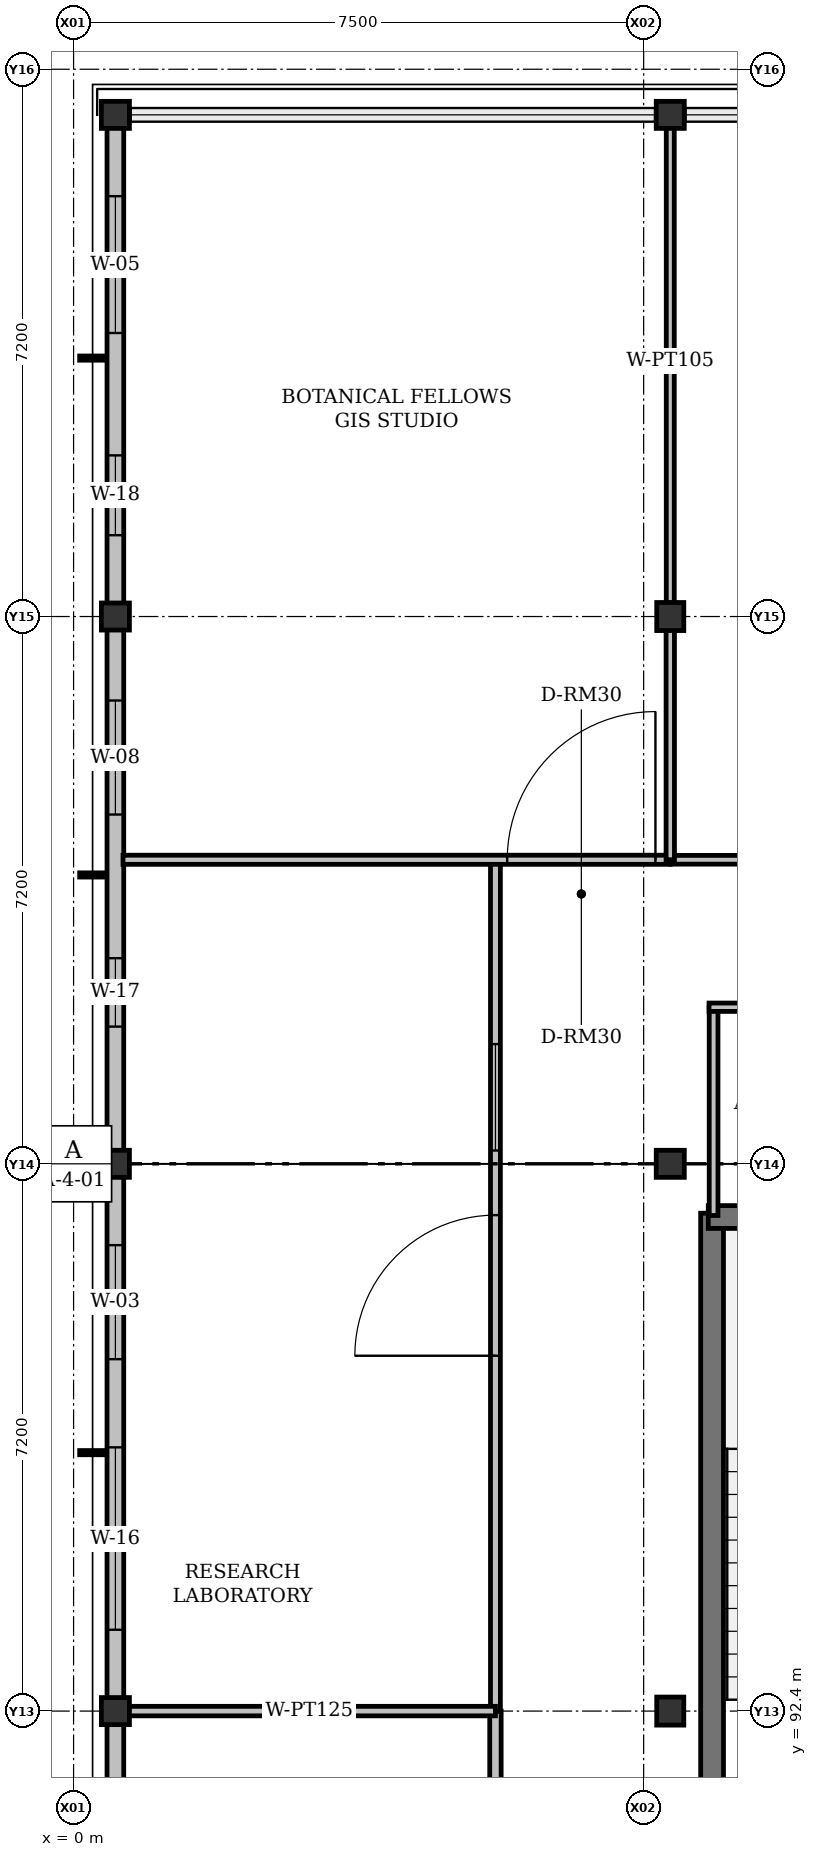
"""IFC4 building model, lengths in metres.
Left out: names, types, materials, properties, quantities, classifications, styles, units other than length and angle.
Written with IfcOpenShell. Run it as: python <this file> out.ifc"""

import sys

from ifc_helpers import new_model, si_unit, direction, frame, frame_2d, origin, origin_2d, place, context, subcontext, project, spatial, rectangle, i_section, extrude, element, fill, save


model = new_model("IFC4")
c1 = context("Model", 3, precision=1e-05, world=origin(), true_north=direction((0.0, 1.0)))
c2 = subcontext(c1, "Body", "Model", "MODEL_VIEW")
j1 = project(units=[si_unit("LENGTHUNIT", "METRE"), si_unit("PLANEANGLEUNIT", "RADIAN")], contexts=[c1])
p1 = place(None, origin())
s1 = spatial("IfcSite", under=j1, at=p1, CompositionType="ELEMENT")
p2 = place(p1, origin())
s2 = spatial("IfcBuilding", under=s1, at=p2, CompositionType="ELEMENT")
p3 = place(p2, frame((0.0, 0.0, 51.9)))
s3 = spatial("IfcBuildingStorey", under=s2, at=p3, CompositionType="ELEMENT", Elevation=51.9)
for number, where, z_axis, x_axis in (
    (1, (0.55, 92.4, 0.0), (0.0, 0.0, 1.0), (1.0, 0.0, 0.0)),
    (2, (7.85, 92.4, 0.0), (0.0, 0.0, 1.0), (0.0, 1.0, 0.0)),
    (3, (0.55, 99.6, 0.0), (0.0, 0.0, 1.0), (1.0, 0.0, 0.0)),
    (4, (7.85, 99.6, 0.0), (0.0, 0.0, 1.0), (1.0, 0.0, 0.0)),
    (5, (0.55, 106.8, 0.0), (0.0, 0.0, 1.0), (1.0, 0.0, 0.0)),
    (6, (7.85, 106.8, 0.0), (0.0, 0.0, 1.0), (0.0, 1.0, 0.0)),
    (7, (0.55, 113.4, 0.0), (0.0, 0.0, 1.0), (1.0, 0.0, 0.0)),
    (8, (7.85, 113.4, 0.0), (0.0, 0.0, 1.0), (1.0, 0.0, 0.0)),
):
    element("IfcColumn", number, at=place(p3, frame(where, z_axis=z_axis, x_axis=x_axis)), inside=s3, PredefinedType="COLUMN", context=c2, shape_type="SweptSolid", body=[
        extrude(i_section(OverallWidth=0.369, OverallDepth=0.356, WebThickness=0.011, FlangeThickness=0.018, FilletRadius=0.015, at=origin_2d()), origin(), (0.0, 0.0, 1.0), 4.2),
    ])
p4 = place(p3, frame((0.55, 85.2, 0.0), z_axis=(0.0, 0.0, 1.0), x_axis=(0.0, 1.0, 0.0)))
e9 = element("IfcWall", 9, at=p4, inside=s3, PredefinedType="SOLIDWALL", context=c2, shape_type="SweptSolid", body=[
    extrude(rectangle(XDim=7.2, YDim=0.22, at=frame_2d((3.6, 0.0))), origin(), (0.0, 0.0, 1.0), 3.577),
])
p5 = place(p4, frame((1.07, 0.0, 0.92)))
e10 = element("IfcOpeningElement", 10, at=p5, cuts=e9, PredefinedType="OPENING", context=c2, shape_type="SweptSolid", body=[
    extrude(rectangle(XDim=2.1, YDim=1.7, at=frame_2d((1.05, 0.85))), frame((0.0, 0.11, 0.0), z_axis=(0.0, -1.0, 0.0), x_axis=(1.0, 0.0, 0.0)), (0.0, 0.0, 1.0), 0.22),
])
p6 = place(p4, frame((4.78, 0.0, 0.92)))
e11 = element("IfcOpeningElement", 11, at=p6, cuts=e9, PredefinedType="OPENING", context=c2, shape_type="SweptSolid", body=[
    extrude(rectangle(XDim=1.35, YDim=1.4, at=frame_2d((0.675, 0.7))), frame((0.0, 0.11, 0.0), z_axis=(0.0, -1.0, 0.0), x_axis=(1.0, 0.0, 0.0)), (0.0, 0.0, 1.0), 0.22),
])
p7 = place(p3, frame((0.55, 92.4, 0.0), z_axis=(0.0, 0.0, 1.0), x_axis=(0.0, 1.0, 0.0)))
e12 = element("IfcWall", 12, at=p7, inside=s3, PredefinedType="SOLIDWALL", context=c2, shape_type="SweptSolid", body=[
    extrude(rectangle(XDim=7.2, YDim=0.22, at=frame_2d((3.6, 0.0))), origin(), (0.0, 0.0, 1.0), 3.577),
])
p8 = place(p7, frame((1.07, 0.0, 0.92)))
e13 = element("IfcOpeningElement", 13, at=p8, cuts=e12, PredefinedType="OPENING", context=c2, shape_type="SweptSolid", body=[
    extrude(rectangle(XDim=2.4, YDim=1.7, at=frame_2d((1.2, 0.85))), frame((0.0, 0.11, 0.0), z_axis=(0.0, -1.0, 0.0), x_axis=(1.0, 0.0, 0.0)), (0.0, 0.0, 1.0), 0.22),
])
p9 = place(p7, frame((4.63, 0.0, 0.92)))
e14 = element("IfcOpeningElement", 14, at=p9, cuts=e12, PredefinedType="OPENING", context=c2, shape_type="SweptSolid", body=[
    extrude(rectangle(XDim=1.5, YDim=1.4, at=frame_2d((0.75, 0.7))), frame((0.0, 0.11, 0.0), z_axis=(0.0, -1.0, 0.0), x_axis=(1.0, 0.0, 0.0)), (0.0, 0.0, 1.0), 0.22),
])
p10 = place(p3, frame((0.55, 99.6, 0.0), z_axis=(0.0, 0.0, 1.0), x_axis=(0.0, 1.0, 0.0)))
e15 = element("IfcWall", 15, at=p10, inside=s3, PredefinedType="SOLIDWALL", context=c2, shape_type="SweptSolid", body=[
    extrude(rectangle(XDim=7.2, YDim=0.22, at=frame_2d((3.6, 0.0))), origin(), (0.0, 0.0, 1.0), 3.577),
])
p11 = place(p10, frame((1.805, 0.0, 0.92)))
e16 = element("IfcOpeningElement", 16, at=p11, cuts=e15, PredefinedType="OPENING", context=c2, shape_type="SweptSolid", body=[
    extrude(rectangle(XDim=0.9, YDim=1.3, at=frame_2d((0.45, 0.65))), frame((0.0, 0.11, 0.0), z_axis=(0.0, -1.0, 0.0), x_axis=(1.0, 0.0, 0.0)), (0.0, 0.0, 1.0), 0.22),
])
p12 = place(p10, frame((4.595, 0.0, 0.92)))
e17 = element("IfcOpeningElement", 17, at=p12, cuts=e15, PredefinedType="OPENING", context=c2, shape_type="SweptSolid", body=[
    extrude(rectangle(XDim=1.5, YDim=1.55, at=frame_2d((0.75, 0.775))), frame((0.0, 0.11, 0.0), z_axis=(0.0, -1.0, 0.0), x_axis=(1.0, 0.0, 0.0)), (0.0, 0.0, 1.0), 0.22),
])
p13 = place(p3, frame((0.55, 106.8, 0.0), z_axis=(0.0, 0.0, 1.0), x_axis=(0.0, 1.0, 0.0)))
e18 = element("IfcWall", 18, at=p13, inside=s3, PredefinedType="SOLIDWALL", context=c2, shape_type="SweptSolid", body=[
    extrude(rectangle(XDim=6.6, YDim=0.22, at=frame_2d((3.3, 0.0))), origin(), (0.0, 0.0, 1.0), 3.577),
])
p14 = place(p13, frame((1.07, 0.0, 0.92)))
e19 = element("IfcOpeningElement", 19, at=p14, cuts=e18, PredefinedType="OPENING", context=c2, shape_type="SweptSolid", body=[
    extrude(rectangle(XDim=1.05, YDim=1.3, at=frame_2d((0.525, 0.65))), frame((0.0, 0.11, 0.0), z_axis=(0.0, -1.0, 0.0), x_axis=(1.0, 0.0, 0.0)), (0.0, 0.0, 1.0), 0.22),
])
p15 = place(p13, frame((3.73, 0.0, 0.92)))
e20 = element("IfcOpeningElement", 20, at=p15, cuts=e18, PredefinedType="OPENING", context=c2, shape_type="SweptSolid", body=[
    extrude(rectangle(XDim=1.8, YDim=1.4, at=frame_2d((0.9, 0.7))), frame((0.0, 0.11, 0.0), z_axis=(0.0, -1.0, 0.0), x_axis=(1.0, 0.0, 0.0)), (0.0, 0.0, 1.0), 0.22),
])
p16 = place(p3, frame((8.4, 90.775, 0.0), z_axis=(0.0, 0.0, 1.0), x_axis=(0.0, 1.0, 0.0)))
e21 = element("IfcWall", 21, at=p16, inside=s3, PredefinedType="SHEAR", context=c2, shape_type="SweptSolid", body=[
    extrude(rectangle(XDim=8.175, YDim=0.3, at=frame_2d((4.087, 0.0))), origin(), (0.0, 0.0, 1.0), 4.2),
])
p17 = place(p3, frame((8.35, 98.9, 0.0), z_axis=(0.0, 0.0, 1.0), x_axis=(1.0, 0.0, 0.0)))
e22 = element("IfcWall", 22, at=p17, inside=s3, PredefinedType="SHEAR", context=c2, shape_type="SweptSolid", body=[
    extrude(rectangle(XDim=3.77, YDim=0.3, at=frame_2d((1.885, 0.0))), origin(), (0.0, 0.0, 1.0), 4.2),
])
p18 = place(p3, frame((8.42, 98.92, 0.0), z_axis=(0.0, 0.0, 1.0), x_axis=(0.0, 1.0, 0.0)))
e23 = element("IfcWall", 23, at=p18, inside=s3, PredefinedType="PARTITIONING", context=c2, shape_type="SweptSolid", body=[
    extrude(rectangle(XDim=2.74, YDim=0.115, at=frame_2d((1.37, 0.0))), origin(), (0.0, 0.0, 1.0), 3.451),
])
p19 = place(p3, frame((8.36, 101.66, 0.0), z_axis=(0.0, 0.0, 1.0), x_axis=(1.0, 0.0, 0.0)))
e24 = element("IfcWall", 24, at=p19, inside=s3, PredefinedType="PARTITIONING", context=c2, shape_type="SweptSolid", body=[
    extrude(rectangle(XDim=3.7, YDim=0.11, at=frame_2d((1.85, 0.0))), origin(), (0.0, 0.0, 1.0), 3.95),
])
p20 = place(p3, frame((5.55, 78.0, 0.0), z_axis=(0.0, 0.0, 1.0), x_axis=(0.0, 1.0, 0.0)))
e25 = element("IfcWall", 25, at=p20, inside=s3, PredefinedType="PARTITIONING", context=c2, shape_type="SweptSolid", body=[
    extrude(rectangle(XDim=14.4, YDim=0.15, at=frame_2d((7.2, 0.0))), origin(), (0.0, 0.0, 1.0), 3.451),
])
p21 = place(p20, frame((6.325, 0.0, 0.0)))
e26 = element("IfcOpeningElement", 26, at=p21, cuts=e25, PredefinedType="OPENING", context=c2, shape_type="SweptSolid", body=[
    extrude(rectangle(XDim=1.75, YDim=2.35, at=frame_2d((0.875, 1.175))), frame((0.0, 0.075, 0.0), z_axis=(0.0, -1.0, 0.0), x_axis=(1.0, 0.0, 0.0)), (0.0, 0.0, 1.0), 0.15),
])
p22 = place(p20, frame((8.925, 0.0, 0.92)))
e27 = element("IfcOpeningElement", 27, at=p22, cuts=e25, PredefinedType="OPENING", context=c2, shape_type="SweptSolid", body=[
    extrude(rectangle(XDim=1.2, YDim=1.2, at=frame_2d((0.6, 0.6))), frame((0.0, 0.075, 0.0), z_axis=(0.0, -1.0, 0.0), x_axis=(1.0, 0.0, 0.0)), (0.0, 0.0, 1.0), 0.15),
])
p23 = place(p3, frame((5.55, 92.4, 0.0), z_axis=(0.0, 0.0, 1.0), x_axis=(0.0, 1.0, 0.0)))
e28 = element("IfcWall", 28, at=p23, inside=s3, PredefinedType="PARTITIONING", context=c2, shape_type="SweptSolid", body=[
    extrude(rectangle(XDim=11.2, YDim=0.13, at=frame_2d((5.6, 0.0))), origin(), (0.0, 0.0, 1.0), 3.451),
])
p24 = place(p23, frame((4.675, 0.0, 0.0)))
e29 = element("IfcOpeningElement", 29, at=p24, cuts=e28, PredefinedType="OPENING", context=c2, shape_type="SweptSolid", body=[
    extrude(rectangle(XDim=1.85, YDim=2.35, at=frame_2d((0.925, 1.175))), frame((0.0, 0.065, 0.0), z_axis=(0.0, -1.0, 0.0), x_axis=(1.0, 0.0, 0.0)), (0.0, 0.0, 1.0), 0.13),
])
p25 = place(p23, frame((7.375, 0.0, 0.92)))
e30 = element("IfcOpeningElement", 30, at=p25, cuts=e28, PredefinedType="OPENING", context=c2, shape_type="SweptSolid", body=[
    extrude(rectangle(XDim=1.4, YDim=1.2, at=frame_2d((0.7, 0.6))), frame((0.0, 0.065, 0.0), z_axis=(0.0, -1.0, 0.0), x_axis=(1.0, 0.0, 0.0)), (0.0, 0.0, 1.0), 0.13),
])
p26 = place(p3, frame((0.65, 92.4, 0.0), z_axis=(0.0, 0.0, 1.0), x_axis=(1.0, 0.0, 0.0)))
e31 = element("IfcWall", 31, at=p26, inside=s3, PredefinedType="PARTITIONING", context=c2, shape_type="SweptSolid", body=[
    extrude(rectangle(XDim=4.9, YDim=0.125, at=frame_2d((2.45, 0.0))), origin(), (0.0, 0.0, 1.0), 3.451),
])
p27 = place(p3, frame((0.65, 103.6, 0.0), z_axis=(0.0, 0.0, 1.0), x_axis=(1.0, 0.0, 0.0)))
e32 = element("IfcWall", 32, at=p27, inside=s3, PredefinedType="PARTITIONING", context=c2, shape_type="SweptSolid", body=[
    extrude(rectangle(XDim=7.2, YDim=0.12, at=frame_2d((3.6, 0.0))), origin(), (0.0, 0.0, 1.0), 3.527),
])
p28 = place(p27, frame((5.055, 0.0, 0.0)))
e33 = element("IfcOpeningElement", 33, at=p28, cuts=e32, PredefinedType="OPENING", context=c2, shape_type="SweptSolid", body=[
    extrude(rectangle(XDim=1.95, YDim=2.4, at=frame_2d((0.975, 1.2))), frame((0.0, 0.06, 0.0), z_axis=(0.0, -1.0, 0.0), x_axis=(1.0, 0.0, 0.0)), (0.0, 0.0, 1.0), 0.12),
])
p29 = place(p3, frame((7.85, 103.6, 0.0), z_axis=(0.0, 0.0, 1.0), x_axis=(1.0, 0.0, 0.0)))
e34 = element("IfcWall", 34, at=p29, inside=s3, PredefinedType="PARTITIONING", context=c2, shape_type="SweptSolid", body=[
    extrude(rectangle(XDim=16.94, YDim=0.115, at=frame_2d((8.47, 0.0))), origin(), (0.0, 0.0, 1.0), 3.527),
])
p30 = place(p29, frame((2.3, 0.0, 0.0)))
e35 = element("IfcOpeningElement", 35, at=p30, cuts=e34, PredefinedType="OPENING", context=c2, shape_type="SweptSolid", body=[
    extrude(rectangle(XDim=0.9, YDim=2.08, at=frame_2d((0.45, 1.04))), frame((0.0, 0.058, 0.0), z_axis=(0.0, -1.0, 0.0), x_axis=(1.0, 0.0, 0.0)), (0.0, 0.0, 1.0), 0.115),
])
p31 = place(p29, frame((4.05, 0.0, 0.92)))
e36 = element("IfcOpeningElement", 36, at=p31, cuts=e34, PredefinedType="OPENING", context=c2, shape_type="SweptSolid", body=[
    extrude(rectangle(XDim=1.0, YDim=1.3, at=frame_2d((0.5, 0.65))), frame((0.0, 0.058, 0.0), z_axis=(0.0, -1.0, 0.0), x_axis=(1.0, 0.0, 0.0)), (0.0, 0.0, 1.0), 0.115),
])
p32 = place(p3, frame((7.85, 106.621, 0.0), z_axis=(0.0, 0.0, 1.0), x_axis=(0.0, -1.0, 0.0)))
e37 = element("IfcWall", 37, at=p32, inside=s3, PredefinedType="PARTITIONING", context=c2, shape_type="SweptSolid", body=[
    extrude(rectangle(XDim=3.021, YDim=0.11, at=frame_2d((1.51, 0.0))), origin(), (0.0, 0.0, 1.0), 3.527),
])
p33 = place(p3, frame((7.85, 113.35, 0.0), z_axis=(0.0, 0.0, 1.0), x_axis=(0.0, -1.0, 0.0)))
e38 = element("IfcWall", 38, at=p33, inside=s3, PredefinedType="PARTITIONING", context=c2, shape_type="SweptSolid", body=[
    extrude(rectangle(XDim=6.371, YDim=0.105, at=frame_2d((3.185, 0.0))), origin(), (0.0, 0.0, 1.0), 3.527),
])
p34 = place(p8, origin())
e39 = element("IfcWindow", 39, at=p34, inside=s3, PartitioningType="DOUBLE_PANEL_VERTICAL", PredefinedType="WINDOW", context=c2, shape_type="SweptSolid", body=[
    extrude(rectangle(XDim=2.4, YDim=1.7, at=frame_2d((1.2, 0.85))), frame((0.0, 0.03, 0.0), z_axis=(0.0, -1.0, 0.0), x_axis=(1.0, 0.0, 0.0)), (0.0, 0.0, 1.0), 0.06),
])
fill(e13, e39)
p35 = place(p9, origin())
e40 = element("IfcWindow", 40, at=p35, inside=s3, PartitioningType="SINGLE_PANEL", PredefinedType="WINDOW", context=c2, shape_type="SweptSolid", body=[
    extrude(rectangle(XDim=1.5, YDim=1.4, at=frame_2d((0.75, 0.7))), frame((0.0, 0.03, 0.0), z_axis=(0.0, -1.0, 0.0), x_axis=(1.0, 0.0, 0.0)), (0.0, 0.0, 1.0), 0.06),
])
fill(e14, e40)
p36 = place(p11, origin())
e41 = element("IfcWindow", 41, at=p36, inside=s3, PartitioningType="SINGLE_PANEL", PredefinedType="WINDOW", context=c2, shape_type="SweptSolid", body=[
    extrude(rectangle(XDim=0.9, YDim=1.3, at=frame_2d((0.45, 0.65))), frame((0.0, 0.03, 0.0), z_axis=(0.0, -1.0, 0.0), x_axis=(1.0, 0.0, 0.0)), (0.0, 0.0, 1.0), 0.06),
])
fill(e16, e41)
p37 = place(p12, origin())
e42 = element("IfcWindow", 42, at=p37, inside=s3, PartitioningType="SINGLE_PANEL", PredefinedType="WINDOW", context=c2, shape_type="SweptSolid", body=[
    extrude(rectangle(XDim=1.5, YDim=1.55, at=frame_2d((0.75, 0.775))), frame((0.0, 0.03, 0.0), z_axis=(0.0, -1.0, 0.0), x_axis=(1.0, 0.0, 0.0)), (0.0, 0.0, 1.0), 0.06),
])
fill(e17, e42)
p38 = place(p14, origin())
e43 = element("IfcWindow", 43, at=p38, inside=s3, PartitioningType="SINGLE_PANEL", PredefinedType="WINDOW", context=c2, shape_type="SweptSolid", body=[
    extrude(rectangle(XDim=1.05, YDim=1.3, at=frame_2d((0.525, 0.65))), frame((0.0, 0.03, 0.0), z_axis=(0.0, -1.0, 0.0), x_axis=(1.0, 0.0, 0.0)), (0.0, 0.0, 1.0), 0.06),
])
fill(e19, e43)
p39 = place(p15, origin())
e44 = element("IfcWindow", 44, at=p39, inside=s3, PartitioningType="DOUBLE_PANEL_VERTICAL", PredefinedType="WINDOW", context=c2, shape_type="SweptSolid", body=[
    extrude(rectangle(XDim=1.8, YDim=1.4, at=frame_2d((0.9, 0.7))), frame((0.0, 0.03, 0.0), z_axis=(0.0, -1.0, 0.0), x_axis=(1.0, 0.0, 0.0)), (0.0, 0.0, 1.0), 0.06),
])
fill(e20, e44)
p40 = place(p24, origin())
e45 = element("IfcDoor", 45, at=p40, inside=s3, OperationType="SINGLE_SWING_LEFT", PredefinedType="DOOR", context=c2, shape_type="SweptSolid", body=[
    extrude(rectangle(XDim=1.85, YDim=2.35, at=frame_2d((0.925, 1.175))), frame((0.0, 0.025, 0.0), z_axis=(0.0, -1.0, 0.0), x_axis=(1.0, 0.0, 0.0)), (0.0, 0.0, 1.0), 0.05),
])
fill(e29, e45)
p41 = place(p25, origin())
e46 = element("IfcWindow", 46, at=p41, inside=s3, PartitioningType="SINGLE_PANEL", PredefinedType="WINDOW", context=c2, shape_type="SweptSolid", body=[
    extrude(rectangle(XDim=1.4, YDim=1.2, at=frame_2d((0.7, 0.6))), frame((0.0, 0.03, 0.0), z_axis=(0.0, -1.0, 0.0), x_axis=(1.0, 0.0, 0.0)), (0.0, 0.0, 1.0), 0.06),
])
fill(e30, e46)
p42 = place(p28, origin())
e47 = element("IfcDoor", 47, at=p42, inside=s3, OperationType="SINGLE_SWING_RIGHT", PredefinedType="DOOR", context=c2, shape_type="SweptSolid", body=[
    extrude(rectangle(XDim=1.95, YDim=2.4, at=frame_2d((0.975, 1.2))), frame((0.0, 0.025, 0.0), z_axis=(0.0, -1.0, 0.0), x_axis=(1.0, 0.0, 0.0)), (0.0, 0.0, 1.0), 0.05),
])
fill(e33, e47)
save(model, sys.argv[1])
